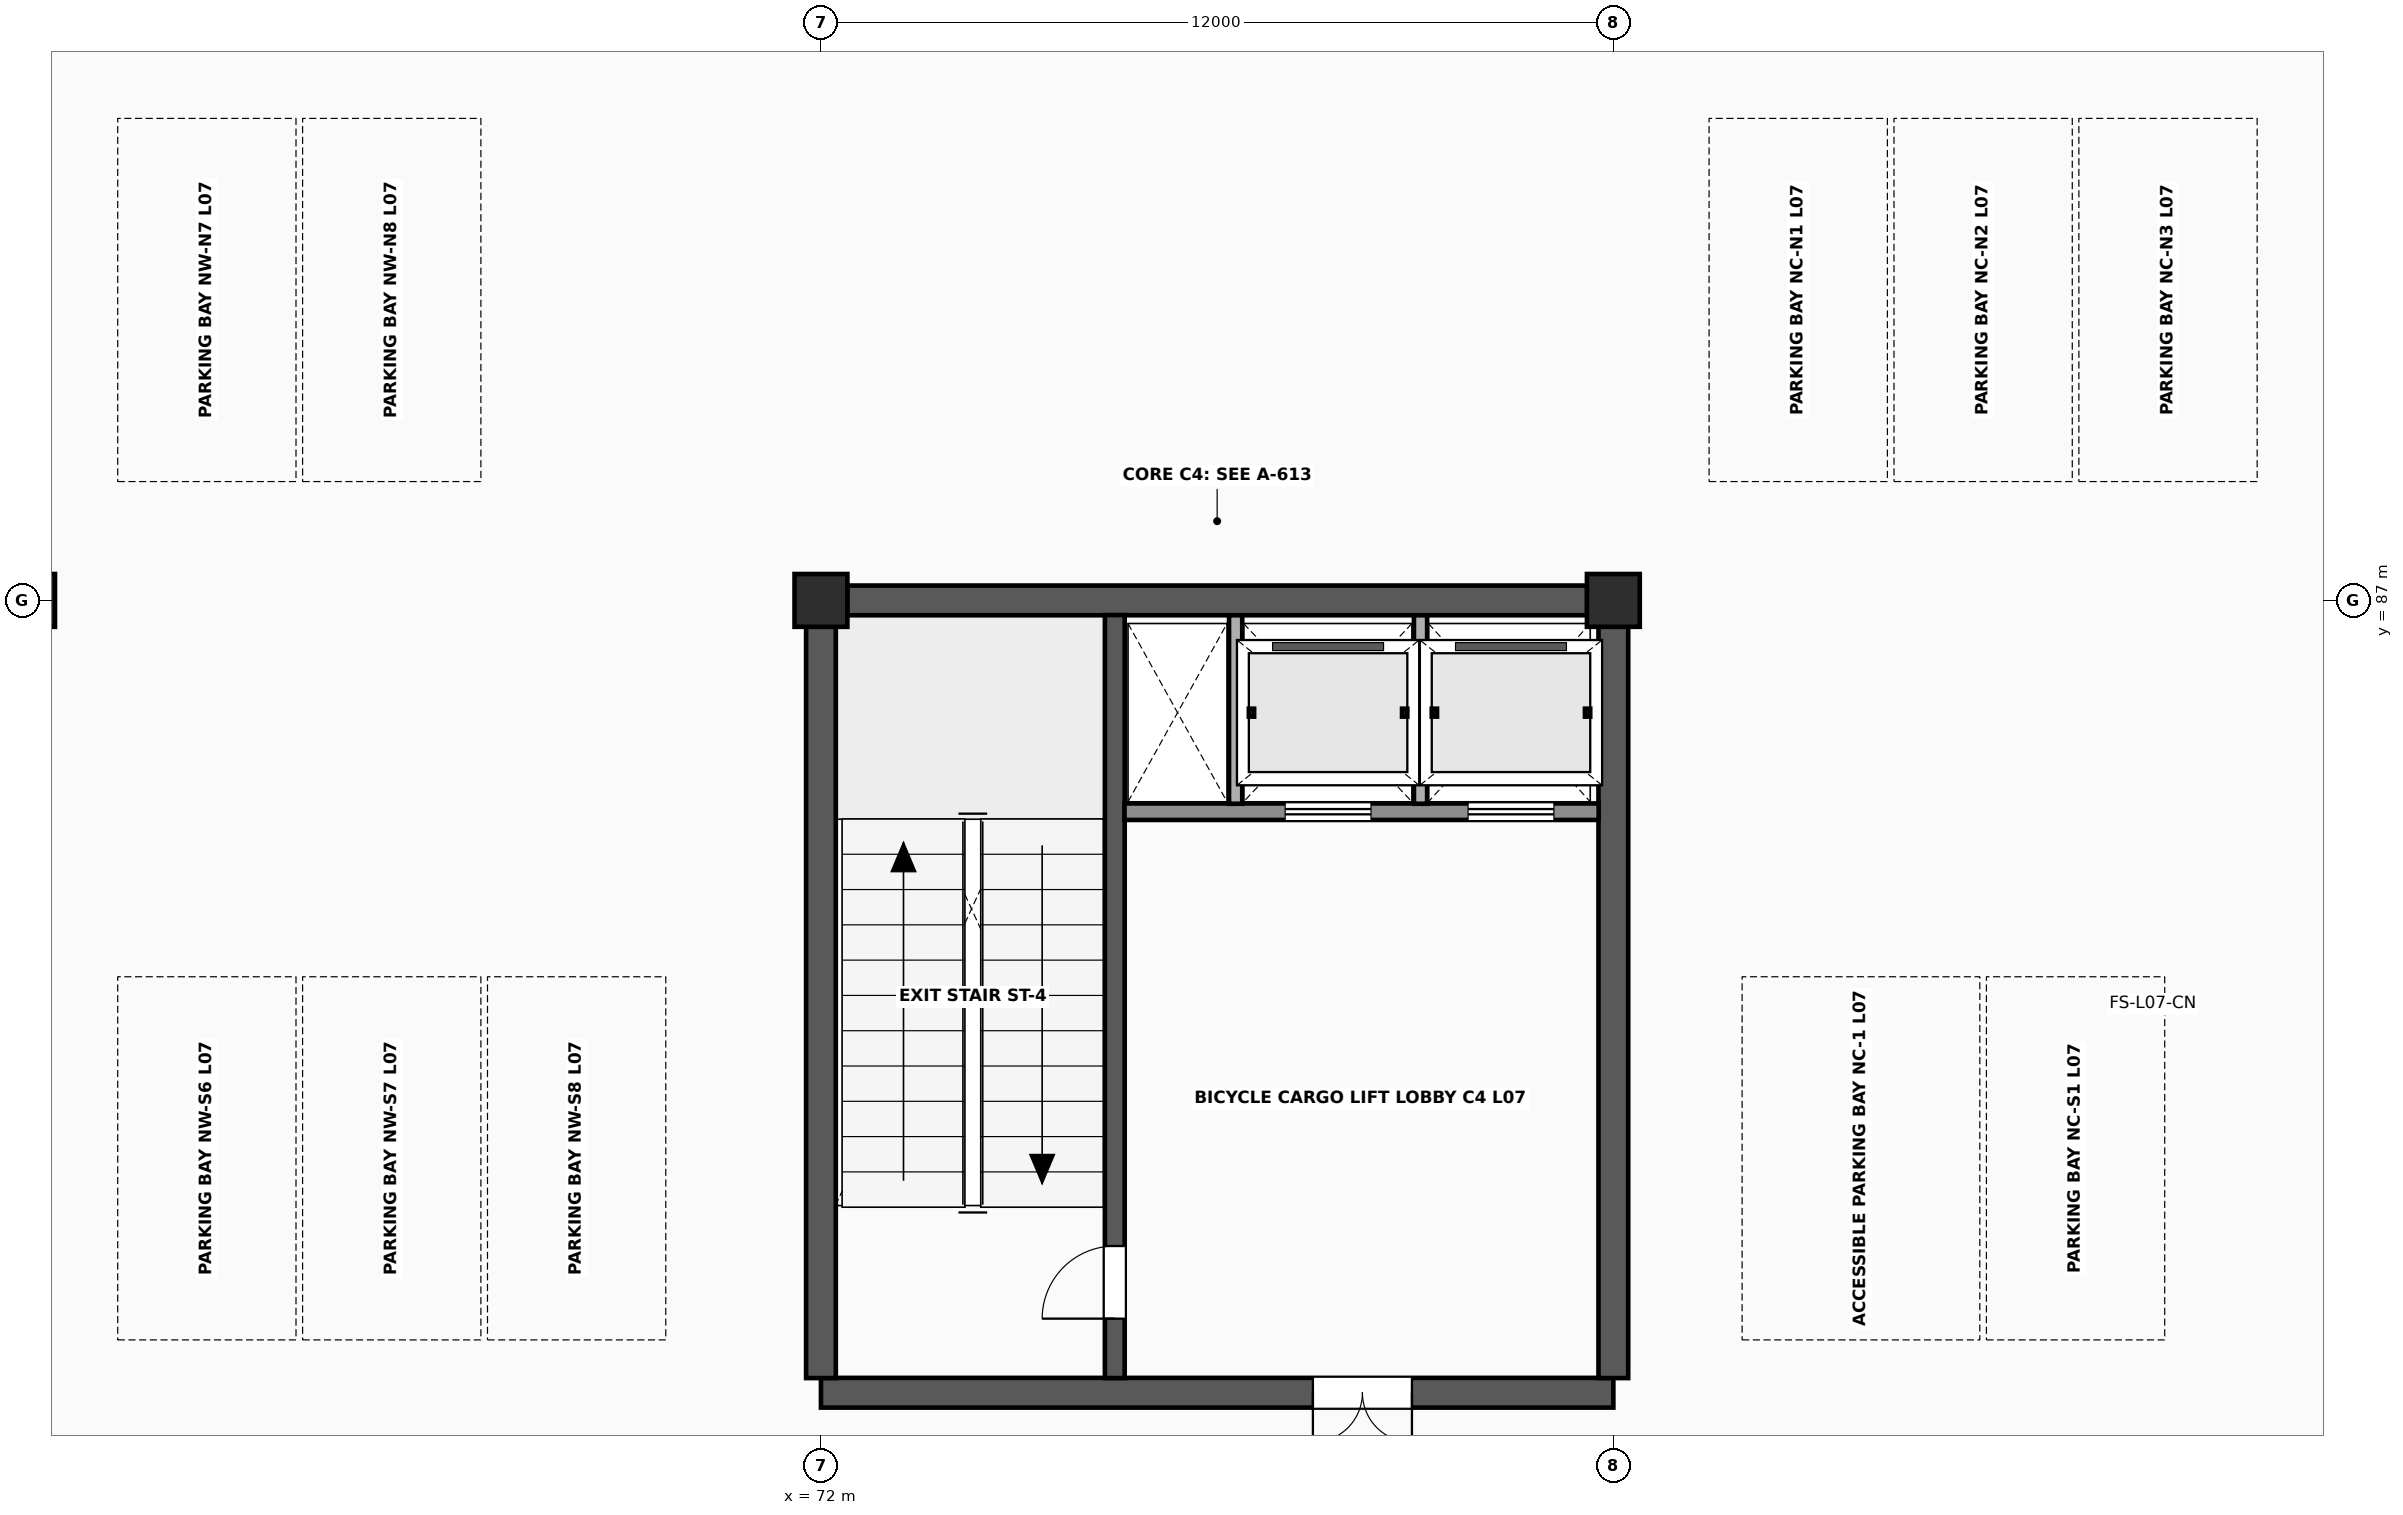
"""IFC4 building model, lengths in metres.
Left out: names, types, materials, properties, quantities, classifications, styles, units other than length and angle.
Written with IfcOpenShell. Run it as: python <this file> out.ifc"""

import sys

from ifc_helpers import new_model, si_unit, direction, frame, frame_2d, origin, origin_2d, place, context, subcontext, project, spatial, rectangle, extrude, element, fill, save


model = new_model("IFC4")
c1 = context("Model", 3, precision=1e-05, world=origin(), true_north=direction((0.0, 1.0)))
c2 = subcontext(c1, "Body", "Model", "MODEL_VIEW")
j1 = project(units=[si_unit("LENGTHUNIT", "METRE"), si_unit("PLANEANGLEUNIT", "RADIAN")], contexts=[c1])
p1 = place(None, origin())
s1 = spatial("IfcSite", under=j1, at=p1, CompositionType="ELEMENT")
p2 = place(p1, origin())
s2 = spatial("IfcBuilding", under=s1, at=p2, CompositionType="ELEMENT")
p3 = place(p2, frame((0.0, 0.0, 28.6)))
s3 = spatial("IfcBuildingStorey", under=s2, at=p3, CompositionType="ELEMENT", Elevation=28.6)
for number, where, z_axis, x_axis in (
    (1, (60.0, 87.0, 0.0), (0.0, 0.0, 1.0), (1.0, 0.0, 0.0)),
    (2, (72.0, 87.0, 0.0), (0.0, 0.0, 1.0), (1.0, 0.0, 0.0)),
    (3, (84.0, 87.0, 0.0), (0.0, 0.0, 1.0), (1.0, 0.0, 0.0)),
):
    element("IfcColumn", number, at=place(p3, frame(where, z_axis=z_axis, x_axis=x_axis)), inside=s3, PredefinedType="COLUMN", context=c2, shape_type="SweptSolid", body=[
        extrude(rectangle(XDim=0.8, YDim=0.8, at=origin_2d()), origin(), (0.0, 0.0, 1.0), 3.8),
    ])
p4 = place(p3, frame((72.0, 75.0, 0.0), z_axis=(0.0, 0.0, 1.0), x_axis=(1.0, 0.0, 0.0)))
e4 = element("IfcWall", 4, at=p4, inside=s3, PredefinedType="SHEAR", context=c2, shape_type="SweptSolid", body=[
    extrude(rectangle(XDim=12.0, YDim=0.45, at=frame_2d((6.0, 0.0))), origin(), (0.0, 0.0, 1.0), 3.553),
])
p5 = place(p4, frame((7.45, 0.0, 0.0)))
e5 = element("IfcOpeningElement", 5, at=p5, cuts=e4, PredefinedType="OPENING", context=c2, shape_type="SweptSolid", body=[
    extrude(rectangle(XDim=1.5, YDim=2.25, at=frame_2d((0.75, 1.125))), frame((0.0, 0.24, 0.0), z_axis=(0.0, -1.0, 0.0), x_axis=(1.0, 0.0, 0.0)), (0.0, 0.0, 1.0), 0.48),
])
p6 = place(p3, frame((72.397, 87.0, 0.0), z_axis=(0.0, 0.0, 1.0), x_axis=(1.0, 0.0, 0.0)))
e6 = element("IfcWall", 6, at=p6, inside=s3, PredefinedType="SHEAR", context=c2, shape_type="SweptSolid", body=[
    extrude(rectangle(XDim=11.206, YDim=0.45, at=frame_2d((5.603, 0.0))), origin(), (0.0, 0.0, 1.0), 3.553),
])
for number, where, z_axis, x_axis in (
    (7, (72.0, 75.222, 0.0), (0.0, 0.0, 1.0), (0.0, 1.0, 0.0)),
    (8, (84.0, 75.222, 0.0), (0.0, 0.0, 1.0), (0.0, 1.0, 0.0)),
):
    element("IfcWall", number, at=place(p3, frame(where, z_axis=z_axis, x_axis=x_axis)), inside=s3, PredefinedType="SHEAR", context=c2, shape_type="SweptSolid", body=[
        extrude(rectangle(XDim=11.381, YDim=0.45, at=frame_2d((5.69, 0.0))), origin(), (0.0, 0.0, 1.0), 3.553),
    ])
p7 = place(p3, frame((76.45, 75.222, 0.0), z_axis=(0.0, 0.0, 1.0), x_axis=(0.0, 1.0, 0.0)))
e9 = element("IfcWall", 9, at=p7, inside=s3, PredefinedType="SHEAR", context=c2, shape_type="SweptSolid", body=[
    extrude(rectangle(XDim=11.556, YDim=0.3, at=frame_2d((5.778, 0.0))), origin(), (0.0, 0.0, 1.0), 3.553),
])
p8 = place(p7, frame((0.9, 0.0, 0.0)))
e10 = element("IfcOpeningElement", 10, at=p8, cuts=e9, PredefinedType="OPENING", context=c2, shape_type="SweptSolid", body=[
    extrude(rectangle(XDim=1.1, YDim=2.2, at=frame_2d((0.55, 1.1))), frame((0.0, 0.165, 0.0), z_axis=(0.0, -1.0, 0.0), x_axis=(1.0, 0.0, 0.0)), (0.0, 0.0, 1.0), 0.33),
])
p9 = place(p3, frame((76.597, 83.8, 0.0), z_axis=(0.0, 0.0, 1.0), x_axis=(1.0, 0.0, 0.0)))
e11 = element("IfcWall", 11, at=p9, inside=s3, PredefinedType="SOLIDWALL", context=c2, shape_type="SweptSolid", body=[
    extrude(rectangle(XDim=7.181, YDim=0.25, at=frame_2d((3.591, 0.0))), origin(), (0.0, 0.0, 1.0), 3.553),
])
p10 = place(p9, frame((2.433, 0.0, 0.0)))
e12 = element("IfcOpeningElement", 12, at=p10, cuts=e11, PredefinedType="OPENING", context=c2, shape_type="SweptSolid", body=[
    extrude(rectangle(XDim=1.3, YDim=2.28, at=frame_2d((0.65, 1.14))), frame((0.0, 0.14, 0.0), z_axis=(0.0, -1.0, 0.0), x_axis=(1.0, 0.0, 0.0)), (0.0, 0.0, 1.0), 0.28),
])
p11 = place(p9, frame((5.203, 0.0, 0.0)))
e13 = element("IfcOpeningElement", 13, at=p11, cuts=e11, PredefinedType="OPENING", context=c2, shape_type="SweptSolid", body=[
    extrude(rectangle(XDim=1.3, YDim=2.28, at=frame_2d((0.65, 1.14))), frame((0.0, 0.14, 0.0), z_axis=(0.0, -1.0, 0.0), x_axis=(1.0, 0.0, 0.0)), (0.0, 0.0, 1.0), 0.28),
])
for number, where, z_axis, x_axis in (
    (14, (78.28, 83.92, 0.0), (0.0, 0.0, 1.0), (0.0, 1.0, 0.0)),
    (15, (81.08, 83.92, 0.0), (0.0, 0.0, 1.0), (0.0, 1.0, 0.0)),
):
    element("IfcWall", number, at=place(p3, frame(where, z_axis=z_axis, x_axis=x_axis)), inside=s3, PredefinedType="SOLIDWALL", context=c2, shape_type="SweptSolid", body=[
        extrude(rectangle(XDim=2.855, YDim=0.2, at=frame_2d((1.427, 0.0))), origin(), (0.0, 0.0, 1.0), 3.543),
    ])
p12 = place(p8, origin())
e16 = element("IfcDoor", 16, at=p12, inside=s3, OperationType="SINGLE_SWING_LEFT", PredefinedType="DOOR", context=c2, shape_type="SweptSolid", body=[
    extrude(rectangle(XDim=1.1, YDim=2.2, at=frame_2d((0.55, 1.1))), frame((0.0, 0.025, 0.0), z_axis=(0.0, -1.0, 0.0), x_axis=(1.0, 0.0, 0.0)), (0.0, 0.0, 1.0), 0.05),
])
fill(e10, e16)
p13 = place(p5, origin())
e17 = element("IfcDoor", 17, at=p13, inside=s3, OperationType="DOUBLE_DOOR_SINGLE_SWING", PredefinedType="DOOR", context=c2, shape_type="SweptSolid", body=[
    extrude(rectangle(XDim=1.5, YDim=2.25, at=frame_2d((0.75, 1.125))), frame((0.0, 0.025, 0.0), z_axis=(0.0, -1.0, 0.0), x_axis=(1.0, 0.0, 0.0)), (0.0, 0.0, 1.0), 0.05),
])
fill(e5, e17)
p14 = place(p10, origin())
e18 = element("IfcDoor", 18, at=p14, inside=s3, OperationType="SLIDING_TO_LEFT", PredefinedType="USERDEFINED", context=c2, shape_type="SweptSolid", body=[
    extrude(rectangle(XDim=1.3, YDim=2.28, at=frame_2d((0.65, 1.14))), frame((0.0, 0.025, 0.0), z_axis=(0.0, -1.0, 0.0), x_axis=(1.0, 0.0, 0.0)), (0.0, 0.0, 1.0), 0.05),
])
fill(e12, e18)
p15 = place(p11, origin())
e19 = element("IfcDoor", 19, at=p15, inside=s3, OperationType="SLIDING_TO_LEFT", PredefinedType="USERDEFINED", context=c2, shape_type="SweptSolid", body=[
    extrude(rectangle(XDim=1.3, YDim=2.28, at=frame_2d((0.65, 1.14))), frame((0.0, 0.025, 0.0), z_axis=(0.0, -1.0, 0.0), x_axis=(1.0, 0.0, 0.0)), (0.0, 0.0, 1.0), 0.05),
])
fill(e13, e19)
save(model, sys.argv[1])
